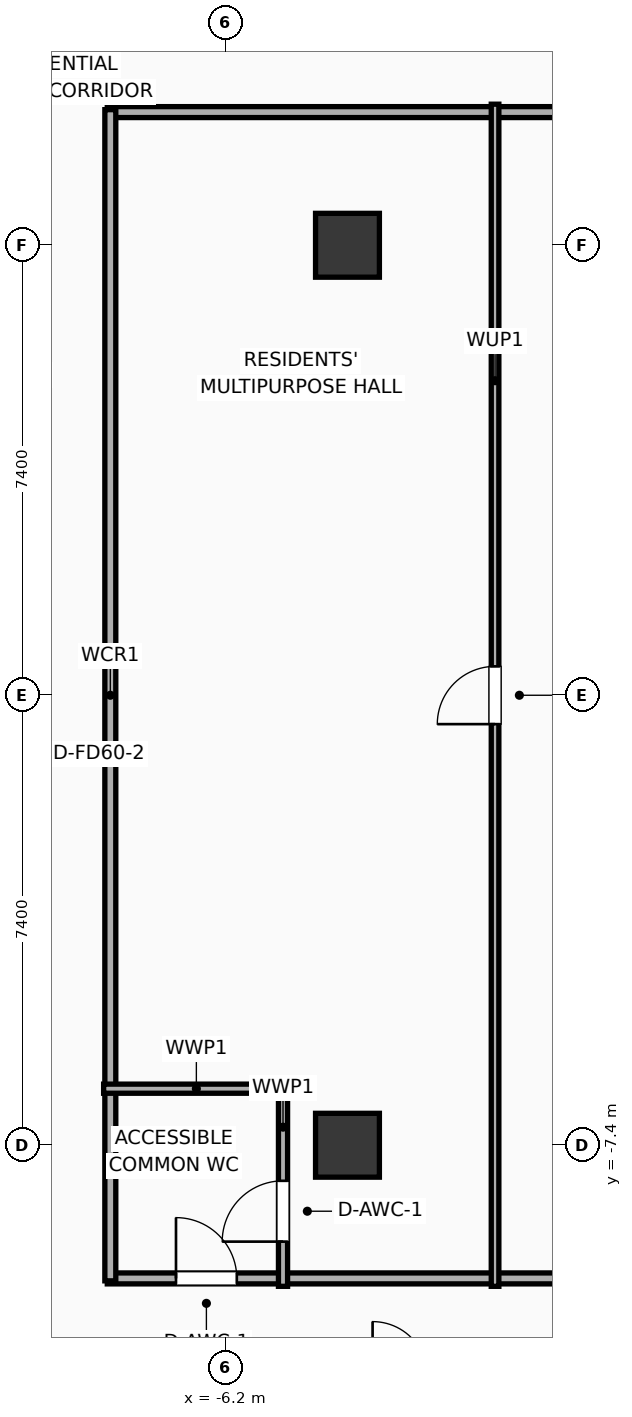
"""IFC4 building model, lengths in metres.
Left out: names, types, materials, properties, quantities, classifications, styles, units other than length and angle.
Written with IfcOpenShell. Run it as: python <this file> out.ifc"""

import sys

from ifc_helpers import new_model, si_unit, direction, frame, frame_2d, origin, origin_2d, place, context, subcontext, project, spatial, rectangle, extrude, element, fill, save


model = new_model("IFC4")
c1 = context("Model", 3, precision=1e-05, world=origin(), true_north=direction((0.0, 1.0)))
c2 = subcontext(c1, "Body", "Model", "MODEL_VIEW")
j1 = project(units=[si_unit("LENGTHUNIT", "METRE"), si_unit("PLANEANGLEUNIT", "RADIAN")], contexts=[c1])
p1 = place(None, origin())
s1 = spatial("IfcSite", under=j1, at=p1, CompositionType="ELEMENT")
p2 = place(p1, origin())
s2 = spatial("IfcBuilding", under=s1, at=p2, CompositionType="ELEMENT")
p3 = place(p2, frame((0.0, 0.0, 120.9)))
s3 = spatial("IfcBuildingStorey", under=s2, at=p3, CompositionType="ELEMENT", Elevation=120.9)
for number, where, z_axis, x_axis in (
    (1, (-4.2, -7.4, 0.0), (0.0, 0.0, 1.0), (1.0, 0.0, 0.0)),
    (2, (-4.2, 7.4, 0.0), (0.0, 0.0, 1.0), (1.0, 0.0, 0.0)),
):
    element("IfcColumn", number, at=place(p3, frame(where, z_axis=z_axis, x_axis=x_axis)), inside=s3, PredefinedType="COLUMN", context=c2, shape_type="SweptSolid", body=[
        extrude(rectangle(XDim=1.05, YDim=1.05, at=origin_2d()), origin(), (0.0, 0.0, 1.0), 3.9),
    ])
p4 = place(p3, frame((-8.15, 9.59, 0.0), z_axis=(0.0, 0.0, 1.0), x_axis=(1.0, 0.0, 0.0)))
e3 = element("IfcWall", 3, at=p4, inside=s3, PredefinedType="PARTITIONING", context=c2, shape_type="SweptSolid", body=[
    extrude(rectangle(XDim=16.3, YDim=0.18, at=frame_2d((8.15, 0.0))), origin(), (0.0, 0.0, 1.0), 3.65),
])
p5 = place(p4, frame((8.49, 0.0, 0.0)))
e4 = element("IfcOpeningElement", 4, at=p5, cuts=e3, PredefinedType="OPENING", context=c2, shape_type="SweptSolid", body=[
    extrude(rectangle(XDim=0.95, YDim=2.05, at=frame_2d((0.475, 1.025))), frame((0.0, 0.1, 0.0), z_axis=(0.0, -1.0, 0.0), x_axis=(1.0, 0.0, 0.0)), (0.0, 0.0, 1.0), 0.2),
])
p6 = place(p3, frame((-8.15, -9.59, 0.0), z_axis=(0.0, 0.0, 1.0), x_axis=(1.0, 0.0, 0.0)))
e5 = element("IfcWall", 5, at=p6, inside=s3, PredefinedType="PARTITIONING", context=c2, shape_type="SweptSolid", body=[
    extrude(rectangle(XDim=16.3, YDim=0.18, at=frame_2d((8.15, 0.0))), origin(), (0.0, 0.0, 1.0), 3.65),
])
p7 = place(p6, frame((1.13, 0.0, 0.0)))
e6 = element("IfcOpeningElement", 6, at=p7, cuts=e5, PredefinedType="OPENING", context=c2, shape_type="SweptSolid", body=[
    extrude(rectangle(XDim=1.0, YDim=2.05, at=frame_2d((0.5, 1.025))), frame((0.0, 0.1, 0.0), z_axis=(0.0, -1.0, 0.0), x_axis=(1.0, 0.0, 0.0)), (0.0, 0.0, 1.0), 0.2),
])
p8 = place(p6, frame((10.12, 0.0, 0.0)))
e7 = element("IfcOpeningElement", 7, at=p8, cuts=e5, PredefinedType="OPENING", context=c2, shape_type="SweptSolid", body=[
    extrude(rectangle(XDim=0.95, YDim=2.05, at=frame_2d((0.475, 1.025))), frame((0.0, 0.1, 0.0), z_axis=(0.0, -1.0, 0.0), x_axis=(1.0, 0.0, 0.0)), (0.0, 0.0, 1.0), 0.2),
])
p9 = place(p3, frame((-8.1, -9.63, 0.0), z_axis=(0.0, 0.0, 1.0), x_axis=(0.0, 1.0, 0.0)))
e8 = element("IfcWall", 8, at=p9, inside=s3, PredefinedType="PARTITIONING", context=c2, shape_type="SweptSolid", body=[
    extrude(rectangle(XDim=19.26, YDim=0.18, at=frame_2d((9.63, 0.0))), origin(), (0.0, 0.0, 1.0), 3.65),
])
p10 = place(p3, frame((-5.26, -9.72, 0.0), z_axis=(0.0, 0.0, 1.0), x_axis=(0.0, 1.0, 0.0)))
e9 = element("IfcWall", 9, at=p10, inside=s3, PredefinedType="PLUMBINGWALL", context=c2, shape_type="SweptSolid", body=[
    extrude(rectangle(XDim=3.35, YDim=0.15, at=frame_2d((1.675, 0.0))), origin(), (0.0, 0.0, 1.0), 3.65),
])
p11 = place(p10, frame((0.735, 0.0, 0.0)))
e10 = element("IfcOpeningElement", 10, at=p11, cuts=e9, PredefinedType="OPENING", context=c2, shape_type="SweptSolid", body=[
    extrude(rectangle(XDim=1.0, YDim=2.05, at=frame_2d((0.5, 1.025))), frame((0.0, 0.085, 0.0), z_axis=(0.0, -1.0, 0.0), x_axis=(1.0, 0.0, 0.0)), (0.0, 0.0, 1.0), 0.17),
])
p12 = place(p3, frame((-8.21, -6.47, 0.0), z_axis=(0.0, 0.0, 1.0), x_axis=(1.0, 0.0, 0.0)))
e11 = element("IfcWall", 11, at=p12, inside=s3, PredefinedType="PLUMBINGWALL", context=c2, shape_type="SweptSolid", body=[
    extrude(rectangle(XDim=3.05, YDim=0.15, at=frame_2d((1.525, 0.0))), origin(), (0.0, 0.0, 1.0), 3.65),
])
p13 = place(p3, frame((-1.773, -9.72, 0.0), z_axis=(0.0, 0.0, 1.0), x_axis=(0.0, 1.0, 0.0)))
e12 = element("IfcWall", 12, at=p13, inside=s3, PredefinedType="PARTITIONING", context=c2, shape_type="SweptSolid", body=[
    extrude(rectangle(XDim=19.44, YDim=0.125, at=frame_2d((9.72, 0.0))), origin(), (0.0, 0.0, 1.0), 3.65),
])
p14 = place(p13, frame((9.245, 0.0, 0.0)))
e13 = element("IfcOpeningElement", 13, at=p14, cuts=e12, PredefinedType="OPENING", context=c2, shape_type="SweptSolid", body=[
    extrude(rectangle(XDim=0.95, YDim=2.05, at=frame_2d((0.475, 1.025))), frame((0.0, 0.073, 0.0), z_axis=(0.0, -1.0, 0.0), x_axis=(1.0, 0.0, 0.0)), (0.0, 0.0, 1.0), 0.145),
])
p15 = place(p7, origin())
e14 = element("IfcDoor", 14, at=p15, inside=s3, OperationType="SINGLE_SWING_LEFT", PredefinedType="DOOR", context=c2, shape_type="SweptSolid", body=[
    extrude(rectangle(XDim=1.0, YDim=2.05, at=frame_2d((0.5, 1.025))), frame((0.0, 0.025, 0.0), z_axis=(0.0, -1.0, 0.0), x_axis=(1.0, 0.0, 0.0)), (0.0, 0.0, 1.0), 0.05),
])
fill(e6, e14)
p16 = place(p11, origin())
e15 = element("IfcDoor", 15, at=p16, inside=s3, OperationType="SINGLE_SWING_LEFT", PredefinedType="DOOR", context=c2, shape_type="SweptSolid", body=[
    extrude(rectangle(XDim=1.0, YDim=2.05, at=frame_2d((0.5, 1.025))), frame((0.0, 0.025, 0.0), z_axis=(0.0, -1.0, 0.0), x_axis=(1.0, 0.0, 0.0)), (0.0, 0.0, 1.0), 0.05),
])
fill(e10, e15)
p17 = place(p14, origin())
e16 = element("IfcDoor", 16, at=p17, inside=s3, OperationType="SINGLE_SWING_LEFT", PredefinedType="DOOR", context=c2, shape_type="SweptSolid", body=[
    extrude(rectangle(XDim=0.95, YDim=2.05, at=frame_2d((0.475, 1.025))), frame((0.0, 0.025, 0.0), z_axis=(0.0, -1.0, 0.0), x_axis=(1.0, 0.0, 0.0)), (0.0, 0.0, 1.0), 0.05),
])
fill(e13, e16)
save(model, sys.argv[1])
